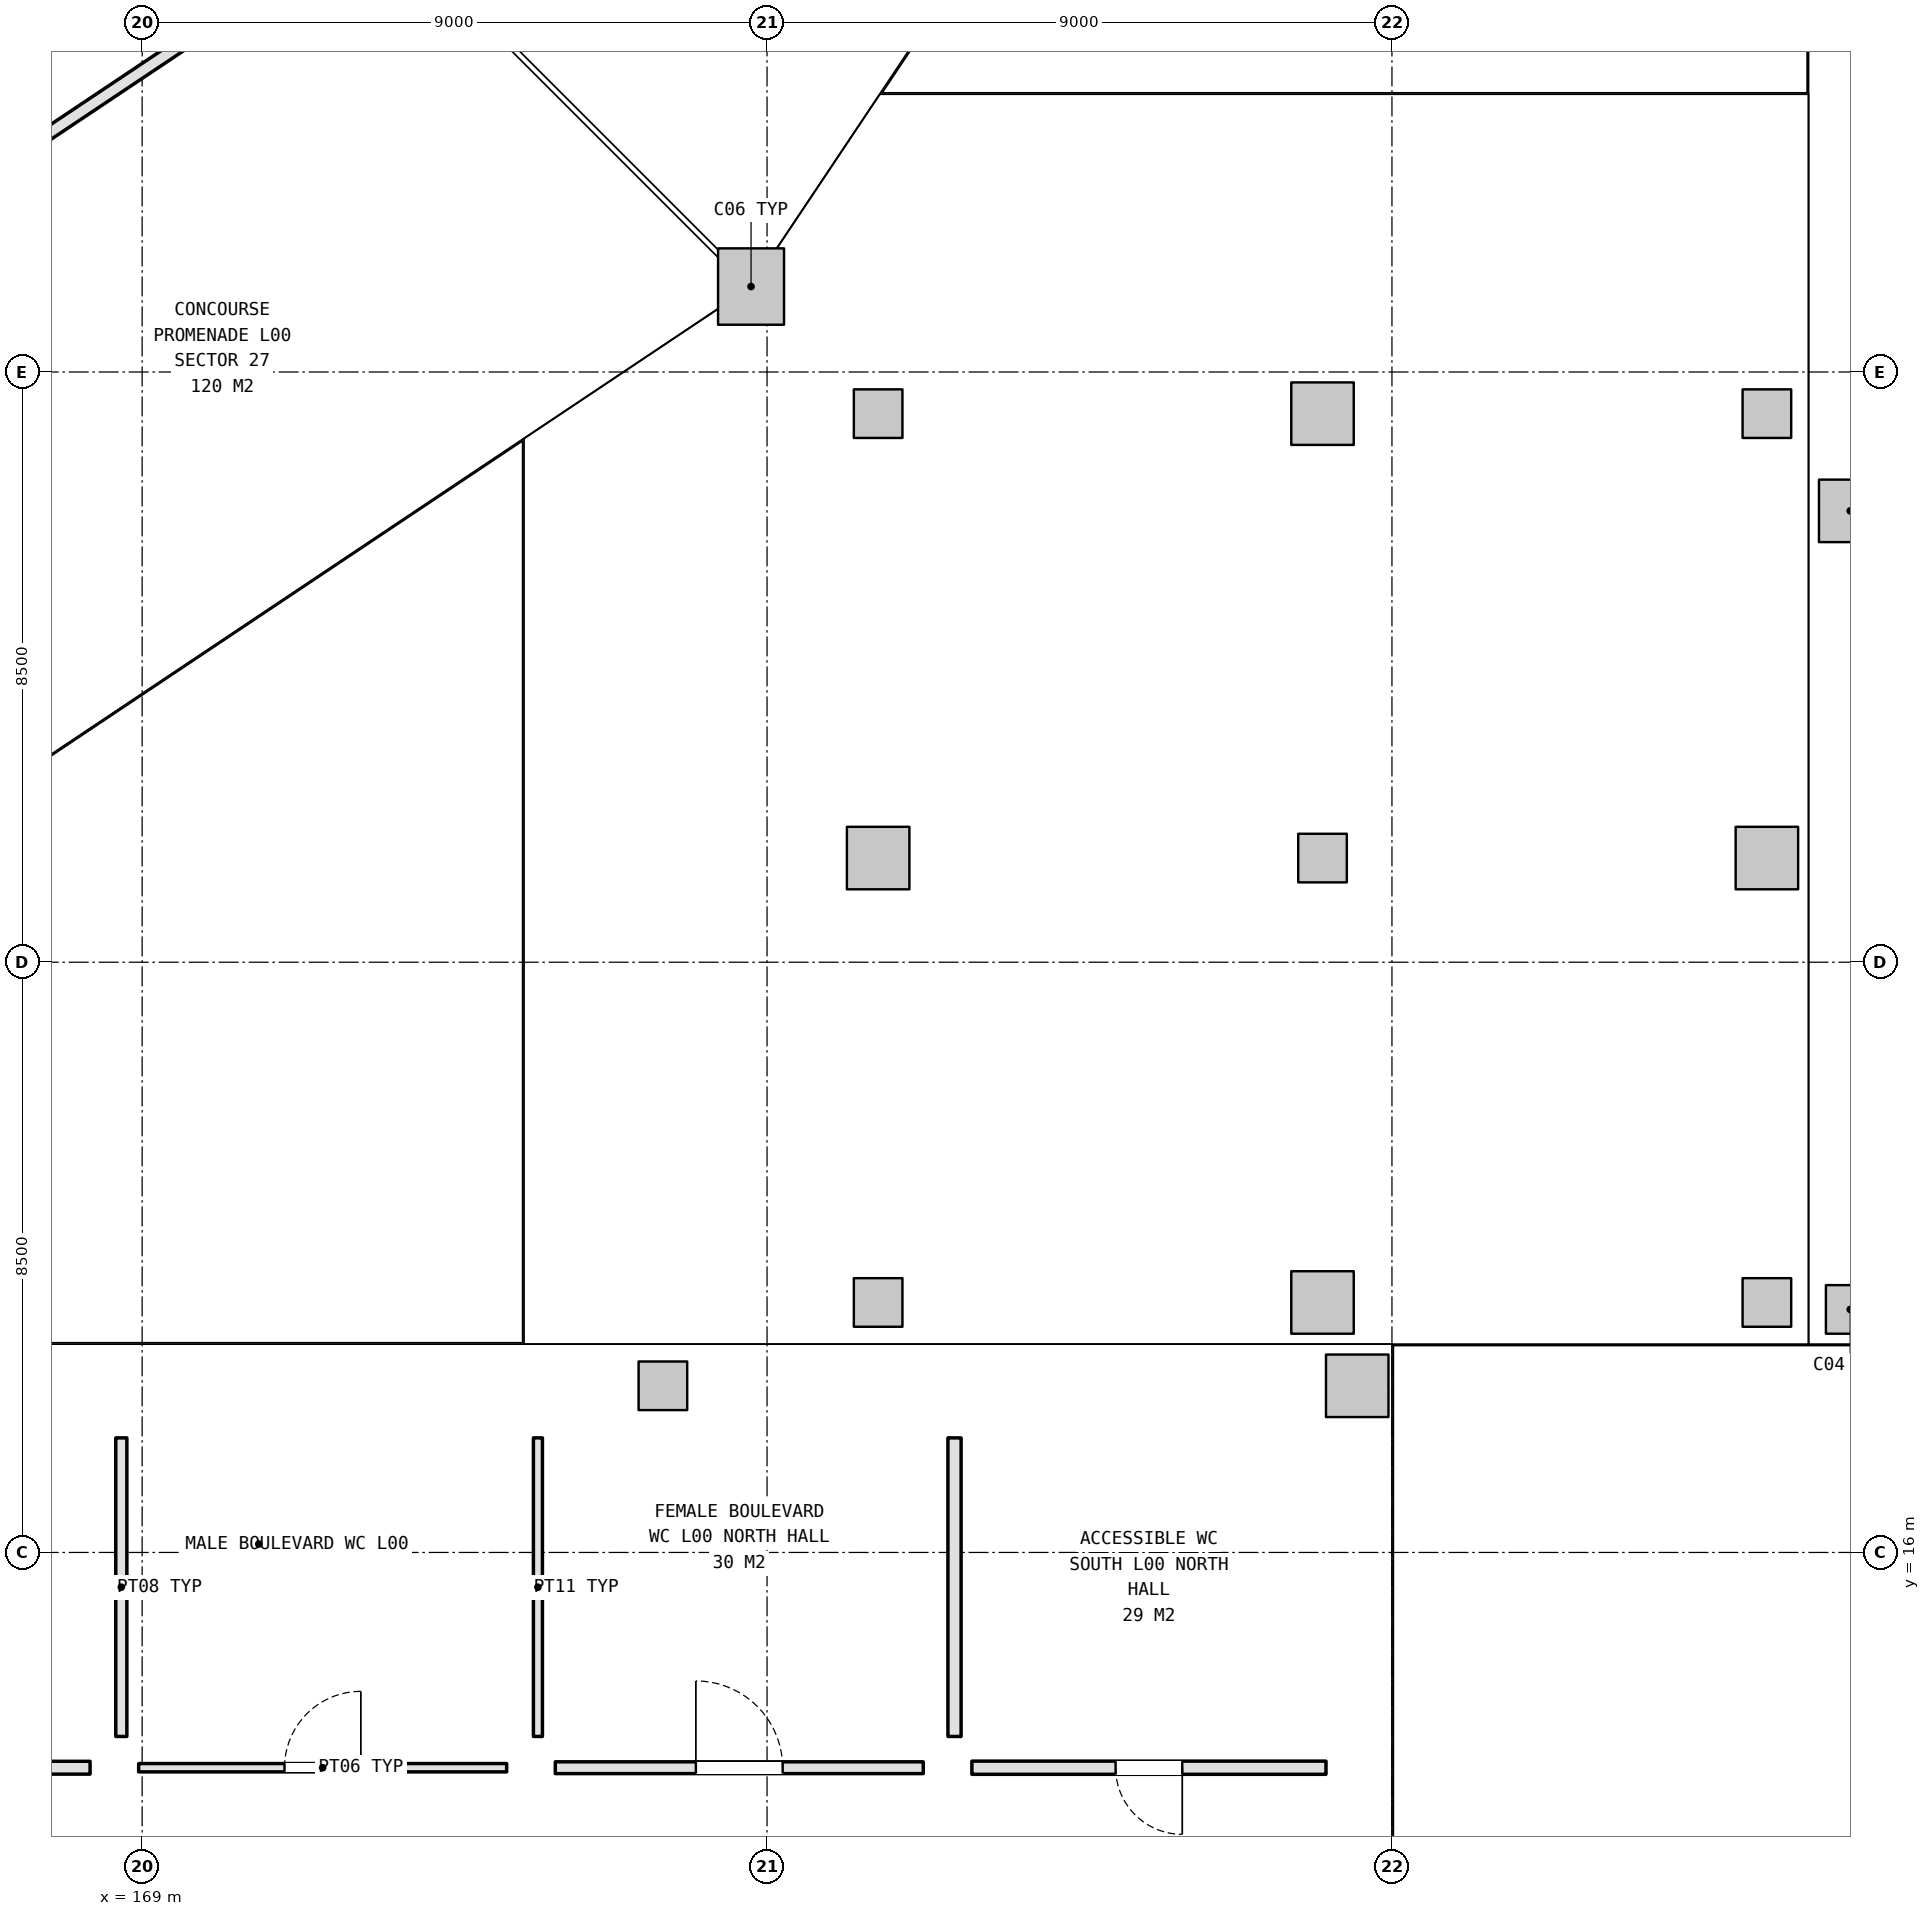
"""IFC4 building model, lengths in metres.
Left out: names, types, materials, properties, quantities, classifications, styles, units other than length and angle.
Written with IfcOpenShell. Run it as: python <this file> out.ifc"""

import sys

from ifc_helpers import new_model, si_unit, direction, frame, frame_2d, origin, origin_2d, place, context, subcontext, project, spatial, rectangle, extrude, element, fill, save


model = new_model("IFC4")
c1 = context("Model", 3, precision=1e-05, world=origin(), true_north=direction((0.0, 1.0)))
c2 = subcontext(c1, "Body", "Model", "MODEL_VIEW")
j1 = project(units=[si_unit("LENGTHUNIT", "METRE"), si_unit("PLANEANGLEUNIT", "RADIAN")], contexts=[c1])
p1 = place(None, origin())
s1 = spatial("IfcSite", under=j1, at=p1, CompositionType="ELEMENT")
p2 = place(p1, origin())
s2 = spatial("IfcBuilding", under=s1, at=p2, CompositionType="ELEMENT")
p3 = place(p2, origin())
s3 = spatial("IfcBuildingStorey", under=s2, at=p3, CompositionType="ELEMENT", Elevation=0.0)
p4 = place(p3, frame((177.77, 34.23, 0.0), z_axis=(0.0, 0.0, 1.0), x_axis=(1.0, 0.0, 0.0)))
e1 = element("IfcColumn", 1, at=p4, inside=s3, PredefinedType="COLUMN", context=c2, shape_type="SweptSolid", body=[
    extrude(rectangle(XDim=0.95, YDim=1.1, at=origin_2d()), origin(), (0.0, 0.0, 1.0), 5.4),
])
p5 = place(p3, frame((193.6, 19.5, 0.0), z_axis=(0.0, 0.0, 1.0), x_axis=(1.0, 0.0, 0.0)))
e2 = element("IfcColumn", 2, at=p5, inside=s3, PredefinedType="COLUMN", context=c2, shape_type="SweptSolid", body=[
    extrude(rectangle(XDim=0.7, YDim=0.7, at=origin_2d()), origin(), (0.0, 0.0, 1.0), 5.4),
])
p6 = place(p3, frame((193.6, 31.0, 0.0), z_axis=(0.0, 0.0, 1.0), x_axis=(1.0, 0.0, 0.0)))
e3 = element("IfcColumn", 3, at=p6, inside=s3, PredefinedType="COLUMN", context=c2, shape_type="SweptSolid", body=[
    extrude(rectangle(XDim=0.9, YDim=0.9, at=origin_2d()), origin(), (0.0, 0.0, 1.0), 5.4),
])
p7 = place(p3, frame((176.5, 18.4, 0.0), z_axis=(0.0, 0.0, 1.0), x_axis=(1.0, 0.0, 0.0)))
e4 = element("IfcColumn", 4, at=p7, inside=s3, PredefinedType="COLUMN", context=c2, shape_type="SweptSolid", body=[
    extrude(rectangle(XDim=0.7, YDim=0.7, at=origin_2d()), origin(), (0.0, 0.0, 1.0), 5.4),
])
p8 = place(p3, frame((186.5, 18.4, 0.0), z_axis=(0.0, 0.0, 1.0), x_axis=(1.0, 0.0, 0.0)))
e5 = element("IfcColumn", 5, at=p8, inside=s3, PredefinedType="COLUMN", context=c2, shape_type="SweptSolid", body=[
    extrude(rectangle(XDim=0.9, YDim=0.9, at=origin_2d()), origin(), (0.0, 0.0, 1.0), 5.4),
])
p9 = place(p3, frame((179.6, 19.6, 0.0), z_axis=(0.0, 0.0, 1.0), x_axis=(1.0, 0.0, 0.0)))
e6 = element("IfcColumn", 6, at=p9, inside=s3, PredefinedType="COLUMN", context=c2, shape_type="SweptSolid", body=[
    extrude(rectangle(XDim=0.7, YDim=0.7, at=origin_2d()), origin(), (0.0, 0.0, 1.0), 5.4),
])
p10 = place(p3, frame((179.6, 26.0, 0.0), z_axis=(0.0, 0.0, 1.0), x_axis=(1.0, 0.0, 0.0)))
e7 = element("IfcColumn", 7, at=p10, inside=s3, PredefinedType="COLUMN", context=c2, shape_type="SweptSolid", body=[
    extrude(rectangle(XDim=0.9, YDim=0.9, at=origin_2d()), origin(), (0.0, 0.0, 1.0), 5.4),
])
p11 = place(p3, frame((179.6, 32.4, 0.0), z_axis=(0.0, 0.0, 1.0), x_axis=(1.0, 0.0, 0.0)))
e8 = element("IfcColumn", 8, at=p11, inside=s3, PredefinedType="COLUMN", context=c2, shape_type="SweptSolid", body=[
    extrude(rectangle(XDim=0.7, YDim=0.7, at=origin_2d()), origin(), (0.0, 0.0, 1.0), 5.4),
])
p12 = place(p3, frame((186.0, 19.6, 0.0), z_axis=(0.0, 0.0, 1.0), x_axis=(1.0, 0.0, 0.0)))
e9 = element("IfcColumn", 9, at=p12, inside=s3, PredefinedType="COLUMN", context=c2, shape_type="SweptSolid", body=[
    extrude(rectangle(XDim=0.9, YDim=0.9, at=origin_2d()), origin(), (0.0, 0.0, 1.0), 5.4),
])
p13 = place(p3, frame((186.0, 26.0, 0.0), z_axis=(0.0, 0.0, 1.0), x_axis=(1.0, 0.0, 0.0)))
e10 = element("IfcColumn", 10, at=p13, inside=s3, PredefinedType="COLUMN", context=c2, shape_type="SweptSolid", body=[
    extrude(rectangle(XDim=0.7, YDim=0.7, at=origin_2d()), origin(), (0.0, 0.0, 1.0), 5.4),
])
p14 = place(p3, frame((186.0, 32.4, 0.0), z_axis=(0.0, 0.0, 1.0), x_axis=(1.0, 0.0, 0.0)))
e11 = element("IfcColumn", 11, at=p14, inside=s3, PredefinedType="COLUMN", context=c2, shape_type="SweptSolid", body=[
    extrude(rectangle(XDim=0.9, YDim=0.9, at=origin_2d()), origin(), (0.0, 0.0, 1.0), 5.4),
])
p15 = place(p3, frame((192.4, 19.6, 0.0), z_axis=(0.0, 0.0, 1.0), x_axis=(1.0, 0.0, 0.0)))
e12 = element("IfcColumn", 12, at=p15, inside=s3, PredefinedType="COLUMN", context=c2, shape_type="SweptSolid", body=[
    extrude(rectangle(XDim=0.7, YDim=0.7, at=origin_2d()), origin(), (0.0, 0.0, 1.0), 5.4),
])
p16 = place(p3, frame((192.4, 26.0, 0.0), z_axis=(0.0, 0.0, 1.0), x_axis=(1.0, 0.0, 0.0)))
e13 = element("IfcColumn", 13, at=p16, inside=s3, PredefinedType="COLUMN", context=c2, shape_type="SweptSolid", body=[
    extrude(rectangle(XDim=0.9, YDim=0.9, at=origin_2d()), origin(), (0.0, 0.0, 1.0), 5.4),
])
p17 = place(p3, frame((192.4, 32.4, 0.0), z_axis=(0.0, 0.0, 1.0), x_axis=(1.0, 0.0, 0.0)))
e14 = element("IfcColumn", 14, at=p17, inside=s3, PredefinedType="COLUMN", context=c2, shape_type="SweptSolid", body=[
    extrude(rectangle(XDim=0.7, YDim=0.7, at=origin_2d()), origin(), (0.0, 0.0, 1.0), 5.4),
])
p18 = place(p3, frame((168.25, 12.9, 0.0), z_axis=(0.0, 0.0, 1.0), x_axis=(-1.0, 0.0, 0.0)))
e15 = element("IfcWall", 15, at=p18, inside=s3, PredefinedType="PARTITIONING", context=c2, shape_type="SweptSolid", body=[
    extrude(rectangle(XDim=19.3, YDim=0.185, at=frame_2d((9.65, 0.0))), origin(), (0.0, 0.0, 1.0), 4.425),
])
p19 = place(p18, frame((9.075, 0.0, 0.0)))
e16 = element("IfcOpeningElement", 16, at=p19, cuts=e15, PredefinedType="OPENING", context=c2, shape_type="SweptSolid", body=[
    extrude(rectangle(XDim=1.15, YDim=2.2, at=frame_2d((0.575, 1.1))), frame((0.0, 0.103, 0.0), z_axis=(0.0, -1.0, 0.0), x_axis=(1.0, 0.0, 0.0)), (0.0, 0.0, 1.0), 0.205),
])
p20 = place(p3, frame((174.25, 12.9, 0.0), z_axis=(0.0, 0.0, 1.0), x_axis=(-1.0, 0.0, 0.0)))
e17 = element("IfcWall", 17, at=p20, inside=s3, PredefinedType="PARTITIONING", context=c2, shape_type="SweptSolid", body=[
    extrude(rectangle(XDim=5.3, YDim=0.12, at=frame_2d((2.65, 0.0))), origin(), (0.0, 0.0, 1.0), 5.12),
])
p21 = place(p20, frame((2.1, 0.0, 0.0)))
e18 = element("IfcOpeningElement", 18, at=p21, cuts=e17, PredefinedType="OPENING", context=c2, shape_type="SweptSolid", body=[
    extrude(rectangle(XDim=1.1, YDim=2.15, at=frame_2d((0.55, 1.075))), frame((0.0, 0.07, 0.0), z_axis=(0.0, -1.0, 0.0), x_axis=(1.0, 0.0, 0.0)), (0.0, 0.0, 1.0), 0.14),
])
p22 = place(p3, frame((168.7, 13.35, 0.0), z_axis=(0.0, 0.0, 1.0), x_axis=(0.0, 1.0, 0.0)))
e19 = element("IfcWall", 19, at=p22, inside=s3, PredefinedType="PARTITIONING", context=c2, shape_type="SweptSolid", body=[
    extrude(rectangle(XDim=4.3, YDim=0.16, at=frame_2d((2.15, 0.0))), origin(), (0.0, 0.0, 1.0), 4.625),
])
p23 = place(p3, frame((180.25, 12.9, 0.0), z_axis=(0.0, 0.0, 1.0), x_axis=(-1.0, 0.0, 0.0)))
e20 = element("IfcWall", 20, at=p23, inside=s3, PredefinedType="PARTITIONING", context=c2, shape_type="SweptSolid", body=[
    extrude(rectangle(XDim=5.3, YDim=0.17, at=frame_2d((2.65, 0.0))), origin(), (0.0, 0.0, 1.0), 4.425),
])
p24 = place(p23, frame((2.025, 0.0, 0.0)))
e21 = element("IfcOpeningElement", 21, at=p24, cuts=e20, PredefinedType="OPENING", context=c2, shape_type="SweptSolid", body=[
    extrude(rectangle(XDim=1.25, YDim=2.2, at=frame_2d((0.625, 1.1))), frame((0.0, 0.095, 0.0), z_axis=(0.0, -1.0, 0.0), x_axis=(1.0, 0.0, 0.0)), (0.0, 0.0, 1.0), 0.19),
])
p25 = place(p3, frame((174.7, 13.35, 0.0), z_axis=(0.0, 0.0, 1.0), x_axis=(0.0, 1.0, 0.0)))
e22 = element("IfcWall", 22, at=p25, inside=s3, PredefinedType="PARTITIONING", context=c2, shape_type="SweptSolid", body=[
    extrude(rectangle(XDim=4.3, YDim=0.13, at=frame_2d((2.15, 0.0))), origin(), (0.0, 0.0, 1.0), 4.625),
])
p26 = place(p3, frame((186.05, 12.9, 0.0), z_axis=(0.0, 0.0, 1.0), x_axis=(-1.0, 0.0, 0.0)))
e23 = element("IfcWall", 23, at=p26, inside=s3, PredefinedType="PARTITIONING", context=c2, shape_type="SweptSolid", body=[
    extrude(rectangle(XDim=5.1, YDim=0.19, at=frame_2d((2.55, 0.0))), origin(), (0.0, 0.0, 1.0), 5.12),
])
p27 = place(p26, frame((2.07, 0.0, 0.0)))
e24 = element("IfcOpeningElement", 24, at=p27, cuts=e23, PredefinedType="OPENING", context=c2, shape_type="SweptSolid", body=[
    extrude(rectangle(XDim=0.96, YDim=2.15, at=frame_2d((0.48, 1.075))), frame((0.0, 0.105, 0.0), z_axis=(0.0, -1.0, 0.0), x_axis=(1.0, 0.0, 0.0)), (0.0, 0.0, 1.0), 0.21),
])
p28 = place(p3, frame((180.7, 13.35, 0.0), z_axis=(0.0, 0.0, 1.0), x_axis=(0.0, 1.0, 0.0)))
e25 = element("IfcWall", 25, at=p28, inside=s3, PredefinedType="PARTITIONING", context=c2, shape_type="SweptSolid", body=[
    extrude(rectangle(XDim=4.3, YDim=0.19, at=frame_2d((2.15, 0.0))), origin(), (0.0, 0.0, 1.0), 4.625),
])
p29 = place(p3, frame((172.188, 39.466, 0.0), z_axis=(0.0, 0.0, 1.0), x_axis=(-0.831467963177, -0.555572701103, 0.0)))
e26 = element("IfcWall", 26, at=p29, inside=s3, PredefinedType="PARTITIONING", context=c2, shape_type="SweptSolid", body=[
    extrude(rectangle(XDim=16.783, YDim=0.18, at=frame_2d((8.392, 0.0))), origin(), (0.0, 0.0, 1.0), 4.345),
])
p30 = place(p29, frame((7.542, 0.0, 0.0)))
e27 = element("IfcOpeningElement", 27, at=p30, cuts=e26, PredefinedType="OPENING", context=c2, shape_type="SweptSolid", body=[
    extrude(rectangle(XDim=1.7, YDim=2.25, at=frame_2d((0.85, 1.125))), frame((0.0, 0.1, 0.0), z_axis=(0.0, -1.0, 0.0), x_axis=(1.0, 0.0, 0.0)), (0.0, 0.0, 1.0), 0.2),
])
p31 = place(p21, frame((1.1, 0.0, 0.0), z_axis=(0.0, 0.0, 1.0), x_axis=(-1.0, 0.0, 0.0)))
e28 = element("IfcDoor", 28, at=p31, inside=s3, OperationType="SINGLE_SWING_LEFT", PredefinedType="DOOR", context=c2, shape_type="SweptSolid", body=[
    extrude(rectangle(XDim=1.1, YDim=2.15, at=frame_2d((0.55, 1.075))), frame((0.0, 0.025, 0.0), z_axis=(0.0, -1.0, 0.0), x_axis=(1.0, 0.0, 0.0)), (0.0, 0.0, 1.0), 0.05),
])
fill(e18, e28)
p32 = place(p24, frame((1.25, 0.0, 0.0), z_axis=(0.0, 0.0, 1.0), x_axis=(-1.0, 0.0, 0.0)))
e29 = element("IfcDoor", 29, at=p32, inside=s3, OperationType="SINGLE_SWING_RIGHT", PredefinedType="DOOR", context=c2, shape_type="SweptSolid", body=[
    extrude(rectangle(XDim=1.25, YDim=2.2, at=frame_2d((0.625, 1.1))), frame((0.0, 0.025, 0.0), z_axis=(0.0, -1.0, 0.0), x_axis=(1.0, 0.0, 0.0)), (0.0, 0.0, 1.0), 0.05),
])
fill(e21, e29)
p33 = place(p27, origin())
e30 = element("IfcDoor", 30, at=p33, inside=s3, OperationType="SINGLE_SWING_LEFT", PredefinedType="DOOR", context=c2, shape_type="SweptSolid", body=[
    extrude(rectangle(XDim=0.96, YDim=2.15, at=frame_2d((0.48, 1.075))), frame((0.0, 0.025, 0.0), z_axis=(0.0, -1.0, 0.0), x_axis=(1.0, 0.0, 0.0)), (0.0, 0.0, 1.0), 0.05),
])
fill(e24, e30)
save(model, sys.argv[1])
